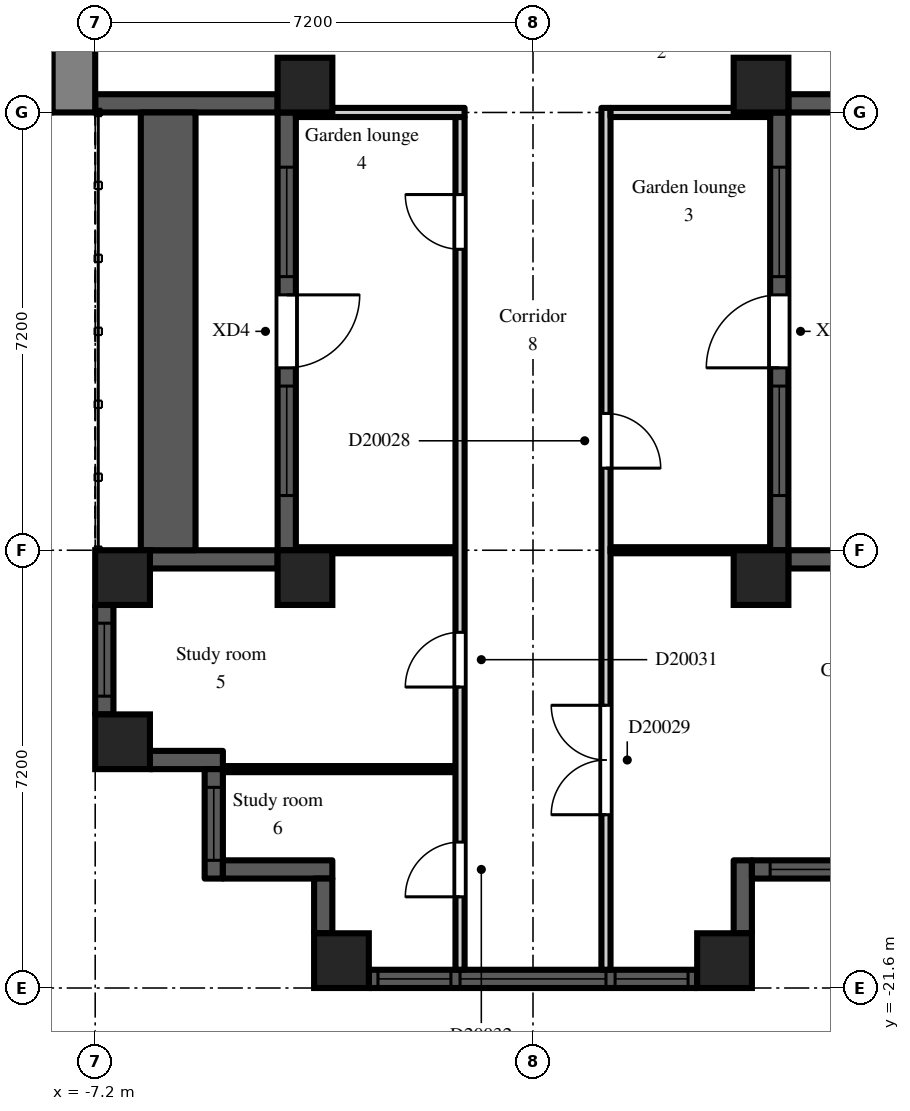
"""IFC4 building model, lengths in metres.
Left out: names, types, materials, properties, quantities, classifications, styles, units other than length and angle.
Written with IfcOpenShell. Run it as: python <this file> out.ifc"""

import sys

from ifc_helpers import new_model, si_unit, direction, frame, frame_2d, origin, origin_2d, place, context, subcontext, project, spatial, rectangle, extrude, element, fill, save


model = new_model("IFC4")
c1 = context("Model", 3, precision=1e-05, world=origin(), true_north=direction((0.0, 1.0)))
c2 = subcontext(c1, "Body", "Model", "MODEL_VIEW")
j1 = project(units=[si_unit("LENGTHUNIT", "METRE"), si_unit("PLANEANGLEUNIT", "RADIAN")], contexts=[c1])
p1 = place(None, origin())
s1 = spatial("IfcSite", under=j1, at=p1, CompositionType="ELEMENT")
p2 = place(p1, origin())
s2 = spatial("IfcBuilding", under=s1, at=p2, CompositionType="ELEMENT")
p3 = place(p2, frame((0.0, 0.0, 138.3)))
s3 = spatial("IfcBuildingStorey", under=s2, at=p3, CompositionType="ELEMENT", Elevation=138.3)
for number, where, z_axis, x_axis in (
    (1, (-6.75, -17.55, 0.0), (0.0, 0.0, 1.0), (1.0, 0.0, 0.0)),
    (2, (-6.75, -14.85, 0.0), (0.0, 0.0, 1.0), (1.0, 0.0, 0.0)),
    (3, (-3.75, -14.85, 0.0), (0.0, 0.0, 1.0), (1.0, 0.0, 0.0)),
    (4, (-3.75, -6.75, 0.0), (0.0, 0.0, 1.0), (1.0, 0.0, 0.0)),
    (5, (-3.15, -21.15, 0.0), (0.0, 0.0, 1.0), (1.0, 0.0, 0.0)),
    (6, (3.15, -21.15, 0.0), (0.0, 0.0, 1.0), (1.0, 0.0, 0.0)),
    (7, (3.75, -14.85, 0.0), (0.0, 0.0, 1.0), (1.0, 0.0, 0.0)),
    (8, (3.75, -6.75, 0.0), (0.0, 0.0, 1.0), (1.0, 0.0, 0.0)),
):
    element("IfcColumn", number, at=place(p3, frame(where, z_axis=z_axis, x_axis=x_axis)), inside=s3, PredefinedType="COLUMN", context=c2, shape_type="SweptSolid", body=[
        extrude(rectangle(XDim=0.9, YDim=0.9, at=origin_2d()), origin(), (0.0, 0.0, 1.0), 3.0),
    ])
p4 = place(p3, frame((-7.2, -7.05, 0.0), z_axis=(0.0, 0.0, 1.0), x_axis=(1.0, 0.0, 0.0)))
e9 = element("IfcWall", 9, at=p4, inside=s3, PredefinedType="SOLIDWALL", context=c2, shape_type="SweptSolid", body=[
    extrude(rectangle(XDim=3.0, YDim=0.3, at=frame_2d((1.5, 0.0))), origin(), (0.0, 0.0, 1.0), 2.2),
])
p5 = place(p3, frame((-4.05, -7.2, 0.0), z_axis=(0.0, 0.0, 1.0), x_axis=(0.0, -1.0, 0.0)))
e10 = element("IfcWall", 10, at=p5, inside=s3, PredefinedType="SOLIDWALL", context=c2, shape_type="SweptSolid", body=[
    extrude(rectangle(XDim=7.2, YDim=0.3, at=frame_2d((3.6, 0.0))), origin(), (0.0, 0.0, 1.0), 2.2),
])
p6 = place(p5, frame((3.0, 0.0, 0.0)))
e11 = element("IfcOpeningElement", 11, at=p6, cuts=e10, PredefinedType="OPENING", context=c2, shape_type="SweptSolid", body=[
    extrude(rectangle(XDim=1.2, YDim=2.05, at=frame_2d((0.6, 1.025))), frame((0.0, 0.16, 0.0), z_axis=(0.0, -1.0, 0.0), x_axis=(1.0, 0.0, 0.0)), (0.0, 0.0, 1.0), 0.32),
])
p7 = place(p5, frame((0.9, 0.0, 0.2)))
e12 = element("IfcOpeningElement", 12, at=p7, cuts=e10, PredefinedType="OPENING", context=c2, shape_type="SweptSolid", body=[
    extrude(rectangle(XDim=1.8, YDim=1.85, at=frame_2d((0.9, 0.925))), frame((0.0, 0.16, 0.0), z_axis=(0.0, -1.0, 0.0), x_axis=(1.0, 0.0, 0.0)), (0.0, 0.0, 1.0), 0.32),
])
p8 = place(p5, frame((4.5, 0.0, 0.2)))
e13 = element("IfcOpeningElement", 13, at=p8, cuts=e10, PredefinedType="OPENING", context=c2, shape_type="SweptSolid", body=[
    extrude(rectangle(XDim=1.8, YDim=1.85, at=frame_2d((0.9, 0.925))), frame((0.0, 0.16, 0.0), z_axis=(0.0, -1.0, 0.0), x_axis=(1.0, 0.0, 0.0)), (0.0, 0.0, 1.0), 0.32),
])
p9 = place(p3, frame((-4.2, -14.55, 0.0), z_axis=(0.0, 0.0, 1.0), x_axis=(-1.0, 0.0, 0.0)))
e14 = element("IfcWall", 14, at=p9, inside=s3, PredefinedType="SOLIDWALL", context=c2, shape_type="SweptSolid", body=[
    extrude(rectangle(XDim=2.1, YDim=0.3, at=frame_2d((1.05, 0.0))), origin(), (0.0, 0.0, 1.0), 2.2),
])
p10 = place(p3, frame((-7.05, -15.3, 0.0), z_axis=(0.0, 0.0, 1.0), x_axis=(0.0, -1.0, 0.0)))
e15 = element("IfcWall", 15, at=p10, inside=s3, PredefinedType="SOLIDWALL", context=c2, shape_type="SweptSolid", body=[
    extrude(rectangle(XDim=1.8, YDim=0.3, at=frame_2d((0.9, 0.0))), origin(), (0.0, 0.0, 1.0), 2.2),
])
p11 = place(p10, frame((0.3, 0.0, 0.2)))
e16 = element("IfcOpeningElement", 16, at=p11, cuts=e15, PredefinedType="OPENING", context=c2, shape_type="SweptSolid", body=[
    extrude(rectangle(XDim=1.2, YDim=1.85, at=frame_2d((0.6, 0.925))), frame((0.0, 0.16, 0.0), z_axis=(0.0, -1.0, 0.0), x_axis=(1.0, 0.0, 0.0)), (0.0, 0.0, 1.0), 0.32),
])
p12 = place(p3, frame((-6.3, -17.85, 0.0), z_axis=(0.0, 0.0, 1.0), x_axis=(1.0, 0.0, 0.0)))
e17 = element("IfcWall", 17, at=p12, inside=s3, PredefinedType="SOLIDWALL", context=c2, shape_type="SweptSolid", body=[
    extrude(rectangle(XDim=1.2, YDim=0.3, at=frame_2d((0.6, 0.0))), origin(), (0.0, 0.0, 1.0), 2.6),
])
p13 = place(p3, frame((-5.25, -18.0, 0.0), z_axis=(0.0, 0.0, 1.0), x_axis=(0.0, -1.0, 0.0)))
e18 = element("IfcWall", 18, at=p13, inside=s3, PredefinedType="SOLIDWALL", context=c2, shape_type="SweptSolid", body=[
    extrude(rectangle(XDim=1.8, YDim=0.3, at=frame_2d((0.9, 0.0))), origin(), (0.0, 0.0, 1.0), 2.6),
])
p14 = place(p13, frame((0.3, 0.0, 0.2)))
e19 = element("IfcOpeningElement", 19, at=p14, cuts=e18, PredefinedType="OPENING", context=c2, shape_type="SweptSolid", body=[
    extrude(rectangle(XDim=1.2, YDim=1.85, at=frame_2d((0.6, 0.925))), frame((0.0, 0.16, 0.0), z_axis=(0.0, -1.0, 0.0), x_axis=(1.0, 0.0, 0.0)), (0.0, 0.0, 1.0), 0.32),
])
p15 = place(p3, frame((-5.1, -19.65, 0.0), z_axis=(0.0, 0.0, 1.0), x_axis=(1.0, 0.0, 0.0)))
e20 = element("IfcWall", 20, at=p15, inside=s3, PredefinedType="SOLIDWALL", context=c2, shape_type="SweptSolid", body=[
    extrude(rectangle(XDim=1.8, YDim=0.3, at=frame_2d((0.9, 0.0))), origin(), (0.0, 0.0, 1.0), 2.6),
])
p16 = place(p3, frame((-3.45, -19.8, 0.0), z_axis=(0.0, 0.0, 1.0), x_axis=(0.0, -1.0, 0.0)))
e21 = element("IfcWall", 21, at=p16, inside=s3, PredefinedType="SOLIDWALL", context=c2, shape_type="SweptSolid", body=[
    extrude(rectangle(XDim=0.9, YDim=0.3, at=frame_2d((0.45, 0.0))), origin(), (0.0, 0.0, 1.0), 2.6),
])
p17 = place(p3, frame((-2.7, -21.45, 0.0), z_axis=(0.0, 0.0, 1.0), x_axis=(1.0, 0.0, 0.0)))
e22 = element("IfcWall", 22, at=p17, inside=s3, PredefinedType="SOLIDWALL", context=c2, shape_type="SweptSolid", body=[
    extrude(rectangle(XDim=5.4, YDim=0.3, at=frame_2d((2.7, 0.0))), origin(), (0.0, 0.0, 1.0), 2.2),
])
p18 = place(p17, frame((1.5, 0.0, 0.2)))
e23 = element("IfcOpeningElement", 23, at=p18, cuts=e22, PredefinedType="OPENING", context=c2, shape_type="SweptSolid", body=[
    extrude(rectangle(XDim=2.4, YDim=1.85, at=frame_2d((1.2, 0.925))), frame((0.0, 0.16, 0.0), z_axis=(0.0, -1.0, 0.0), x_axis=(1.0, 0.0, 0.0)), (0.0, 0.0, 1.0), 0.32),
])
p19 = place(p17, frame((0.15, 0.0, 0.2)))
e24 = element("IfcOpeningElement", 24, at=p19, cuts=e22, PredefinedType="OPENING", context=c2, shape_type="SweptSolid", body=[
    extrude(rectangle(XDim=1.2, YDim=1.85, at=frame_2d((0.6, 0.925))), frame((0.0, 0.16, 0.0), z_axis=(0.0, -1.0, 0.0), x_axis=(1.0, 0.0, 0.0)), (0.0, 0.0, 1.0), 0.32),
])
p20 = place(p17, frame((4.05, 0.0, 0.2)))
e25 = element("IfcOpeningElement", 25, at=p20, cuts=e22, PredefinedType="OPENING", context=c2, shape_type="SweptSolid", body=[
    extrude(rectangle(XDim=1.2, YDim=1.85, at=frame_2d((0.6, 0.925))), frame((0.0, 0.16, 0.0), z_axis=(0.0, -1.0, 0.0), x_axis=(1.0, 0.0, 0.0)), (0.0, 0.0, 1.0), 0.32),
])
p21 = place(p3, frame((3.45, -20.7, 0.0), z_axis=(0.0, 0.0, 1.0), x_axis=(0.0, 1.0, 0.0)))
e26 = element("IfcWall", 26, at=p21, inside=s3, PredefinedType="SOLIDWALL", context=c2, shape_type="SweptSolid", body=[
    extrude(rectangle(XDim=1.2, YDim=0.3, at=frame_2d((0.6, 0.0))), origin(), (0.0, 0.0, 1.0), 2.6),
])
p22 = place(p3, frame((3.6, -19.65, 0.0), z_axis=(0.0, 0.0, 1.0), x_axis=(1.0, 0.0, 0.0)))
e27 = element("IfcWall", 27, at=p22, inside=s3, PredefinedType="SOLIDWALL", context=c2, shape_type="SweptSolid", body=[
    extrude(rectangle(XDim=1.8, YDim=0.3, at=frame_2d((0.9, 0.0))), origin(), (0.0, 0.0, 1.0), 2.6),
])
p23 = place(p22, frame((0.3, 0.0, 0.2)))
e28 = element("IfcOpeningElement", 28, at=p23, cuts=e27, PredefinedType="OPENING", context=c2, shape_type="SweptSolid", body=[
    extrude(rectangle(XDim=1.2, YDim=1.85, at=frame_2d((0.6, 0.925))), frame((0.0, 0.16, 0.0), z_axis=(0.0, -1.0, 0.0), x_axis=(1.0, 0.0, 0.0)), (0.0, 0.0, 1.0), 0.32),
])
p24 = place(p3, frame((6.3, -14.55, 0.0), z_axis=(0.0, 0.0, 1.0), x_axis=(-1.0, 0.0, 0.0)))
e29 = element("IfcWall", 29, at=p24, inside=s3, PredefinedType="SOLIDWALL", context=c2, shape_type="SweptSolid", body=[
    extrude(rectangle(XDim=2.1, YDim=0.3, at=frame_2d((1.05, 0.0))), origin(), (0.0, 0.0, 1.0), 2.2),
])
p25 = place(p3, frame((4.05, -14.4, 0.0), z_axis=(0.0, 0.0, 1.0), x_axis=(0.0, 1.0, 0.0)))
e30 = element("IfcWall", 30, at=p25, inside=s3, PredefinedType="SOLIDWALL", context=c2, shape_type="SweptSolid", body=[
    extrude(rectangle(XDim=7.2, YDim=0.3, at=frame_2d((3.6, 0.0))), origin(), (0.0, 0.0, 1.0), 2.2),
])
p26 = place(p25, frame((3.0, 0.0, 0.0)))
e31 = element("IfcOpeningElement", 31, at=p26, cuts=e30, PredefinedType="OPENING", context=c2, shape_type="SweptSolid", body=[
    extrude(rectangle(XDim=1.2, YDim=2.05, at=frame_2d((0.6, 1.025))), frame((0.0, 0.16, 0.0), z_axis=(0.0, -1.0, 0.0), x_axis=(1.0, 0.0, 0.0)), (0.0, 0.0, 1.0), 0.32),
])
p27 = place(p25, frame((0.9, 0.0, 0.2)))
e32 = element("IfcOpeningElement", 32, at=p27, cuts=e30, PredefinedType="OPENING", context=c2, shape_type="SweptSolid", body=[
    extrude(rectangle(XDim=1.8, YDim=1.85, at=frame_2d((0.9, 0.925))), frame((0.0, 0.16, 0.0), z_axis=(0.0, -1.0, 0.0), x_axis=(1.0, 0.0, 0.0)), (0.0, 0.0, 1.0), 0.32),
])
p28 = place(p25, frame((4.5, 0.0, 0.2)))
e33 = element("IfcOpeningElement", 33, at=p28, cuts=e30, PredefinedType="OPENING", context=c2, shape_type="SweptSolid", body=[
    extrude(rectangle(XDim=1.8, YDim=1.85, at=frame_2d((0.9, 0.925))), frame((0.0, 0.16, 0.0), z_axis=(0.0, -1.0, 0.0), x_axis=(1.0, 0.0, 0.0)), (0.0, 0.0, 1.0), 0.32),
])
p29 = place(p3, frame((4.2, -7.05, 0.0), z_axis=(0.0, 0.0, 1.0), x_axis=(1.0, 0.0, 0.0)))
e34 = element("IfcWall", 34, at=p29, inside=s3, PredefinedType="SOLIDWALL", context=c2, shape_type="SweptSolid", body=[
    extrude(rectangle(XDim=3.0, YDim=0.3, at=frame_2d((1.5, 0.0))), origin(), (0.0, 0.0, 1.0), 2.2),
])
p30 = place(p3, frame((-6.0, -14.4, 0.0), z_axis=(0.0, 0.0, 1.0), x_axis=(0.0, 1.0, 0.0)))
e35 = element("IfcWall", 35, at=p30, inside=s3, PredefinedType="PARAPET", context=c2, shape_type="SweptSolid", body=[
    extrude(rectangle(XDim=7.2, YDim=0.9, at=frame_2d((3.6, 0.0))), origin(), (0.0, 0.0, 1.0), 0.8),
])
p31 = place(p3, frame((-7.55, -7.2, 0.0), z_axis=(0.0, 0.0, 1.0), x_axis=(0.0, 1.0, 0.0)))
e36 = element("IfcWall", 36, at=p31, inside=s3, PredefinedType="SHEAR", context=c2, shape_type="SweptSolid", body=[
    extrude(rectangle(XDim=14.4, YDim=0.7, at=frame_2d((7.2, 0.0))), origin(), (0.0, 0.0, 1.0), 2.6),
])
p32 = place(p31, frame((6.0, 0.0, 0.0)))
e37 = element("IfcOpeningElement", 37, at=p32, cuts=e36, PredefinedType="OPENING", context=c2, shape_type="SweptSolid", body=[
    extrude(rectangle(XDim=2.4, YDim=2.2, at=frame_2d((1.2, 1.1))), frame((0.0, 0.36, 0.0), z_axis=(0.0, -1.0, 0.0), x_axis=(1.0, 0.0, 0.0)), (0.0, 0.0, 1.0), 0.72),
])
p33 = place(p3, frame((-5.1, -18.0, 0.0), z_axis=(0.0, 0.0, 1.0), x_axis=(1.0, 0.0, 0.0)))
e38 = element("IfcWall", 38, at=p33, inside=s3, PredefinedType="PARTITIONING", context=c2, shape_type="SweptSolid", body=[
    extrude(rectangle(XDim=3.825, YDim=0.1, at=frame_2d((1.913, 0.0))), origin(), (0.0, 0.0, 1.0), 2.6),
])
p34 = place(p3, frame((-3.9, -14.4, 0.0), z_axis=(0.0, 0.0, 1.0), x_axis=(1.0, 0.0, 0.0)))
e39 = element("IfcWall", 39, at=p34, inside=s3, PredefinedType="PARTITIONING", context=c2, shape_type="SweptSolid", body=[
    extrude(rectangle(XDim=2.625, YDim=0.1, at=frame_2d((1.312, 0.0))), origin(), (0.0, 0.0, 1.0), 2.6),
])
p35 = place(p3, frame((-3.9, -7.2, 0.0), z_axis=(0.0, 0.0, 1.0), x_axis=(1.0, 0.0, 0.0)))
e40 = element("IfcWall", 40, at=p35, inside=s3, PredefinedType="PARTITIONING", context=c2, shape_type="SweptSolid", body=[
    extrude(rectangle(XDim=2.775, YDim=0.15, at=frame_2d((1.387, 0.0))), origin(), (0.0, 0.0, 1.0), 2.6),
])
p36 = place(p3, frame((-1.2, -21.3, 0.0), z_axis=(0.0, 0.0, 1.0), x_axis=(0.0, 1.0, 0.0)))
e41 = element("IfcWall", 41, at=p36, inside=s3, PredefinedType="PARTITIONING", context=c2, shape_type="SweptSolid", body=[
    extrude(rectangle(XDim=14.025, YDim=0.15, at=frame_2d((7.013, 0.0))), origin(), (0.0, 0.0, 1.0), 2.6),
])
p37 = place(p36, frame((11.85, 0.0, 0.0)))
e42 = element("IfcOpeningElement", 42, at=p37, cuts=e41, PredefinedType="OPENING", context=c2, shape_type="SweptSolid", body=[
    extrude(rectangle(XDim=0.9, YDim=2.1, at=frame_2d((0.45, 1.05))), frame((0.0, 0.085, 0.0), z_axis=(0.0, -1.0, 0.0), x_axis=(1.0, 0.0, 0.0)), (0.0, 0.0, 1.0), 0.17),
])
p38 = place(p36, frame((4.65, 0.0, 0.0)))
e43 = element("IfcOpeningElement", 43, at=p38, cuts=e41, PredefinedType="OPENING", context=c2, shape_type="SweptSolid", body=[
    extrude(rectangle(XDim=0.9, YDim=2.1, at=frame_2d((0.45, 1.05))), frame((0.0, 0.085, 0.0), z_axis=(0.0, -1.0, 0.0), x_axis=(1.0, 0.0, 0.0)), (0.0, 0.0, 1.0), 0.17),
])
p39 = place(p36, frame((1.2, 0.0, 0.0)))
e44 = element("IfcOpeningElement", 44, at=p39, cuts=e41, PredefinedType="OPENING", context=c2, shape_type="SweptSolid", body=[
    extrude(rectangle(XDim=0.9, YDim=2.1, at=frame_2d((0.45, 1.05))), frame((0.0, 0.085, 0.0), z_axis=(0.0, -1.0, 0.0), x_axis=(1.0, 0.0, 0.0)), (0.0, 0.0, 1.0), 0.17),
])
p40 = place(p3, frame((1.2, -21.3, 0.0), z_axis=(0.0, 0.0, 1.0), x_axis=(0.0, 1.0, 0.0)))
e45 = element("IfcWall", 45, at=p40, inside=s3, PredefinedType="PARTITIONING", context=c2, shape_type="SweptSolid", body=[
    extrude(rectangle(XDim=14.175, YDim=0.15, at=frame_2d((7.087, 0.0))), origin(), (0.0, 0.0, 1.0), 2.6),
])
p41 = place(p40, frame((8.25, 0.0, 0.0)))
e46 = element("IfcOpeningElement", 46, at=p41, cuts=e45, PredefinedType="OPENING", context=c2, shape_type="SweptSolid", body=[
    extrude(rectangle(XDim=0.9, YDim=2.1, at=frame_2d((0.45, 1.05))), frame((0.0, 0.085, 0.0), z_axis=(0.0, -1.0, 0.0), x_axis=(1.0, 0.0, 0.0)), (0.0, 0.0, 1.0), 0.17),
])
p42 = place(p40, frame((2.55, 0.0, 0.0)))
e47 = element("IfcOpeningElement", 47, at=p42, cuts=e45, PredefinedType="OPENING", context=c2, shape_type="SweptSolid", body=[
    extrude(rectangle(XDim=1.8, YDim=2.1, at=frame_2d((0.9, 1.05))), frame((0.0, 0.085, 0.0), z_axis=(0.0, -1.0, 0.0), x_axis=(1.0, 0.0, 0.0)), (0.0, 0.0, 1.0), 0.17),
])
p43 = place(p3, frame((1.275, -14.4, 0.0), z_axis=(0.0, 0.0, 1.0), x_axis=(1.0, 0.0, 0.0)))
e48 = element("IfcWall", 48, at=p43, inside=s3, PredefinedType="PARTITIONING", context=c2, shape_type="SweptSolid", body=[
    extrude(rectangle(XDim=2.625, YDim=0.1, at=frame_2d((1.312, 0.0))), origin(), (0.0, 0.0, 1.0), 2.6),
])
p44 = place(p3, frame((1.275, -7.2, 0.0), z_axis=(0.0, 0.0, 1.0), x_axis=(1.0, 0.0, 0.0)))
e49 = element("IfcWall", 49, at=p44, inside=s3, PredefinedType="PARTITIONING", context=c2, shape_type="SweptSolid", body=[
    extrude(rectangle(XDim=2.625, YDim=0.15, at=frame_2d((1.312, 0.0))), origin(), (0.0, 0.0, 1.0), 2.6),
])
p45 = place(p6, origin())
e50 = element("IfcDoor", 50, at=p45, inside=s3, OperationType="SINGLE_SWING_LEFT", PredefinedType="DOOR", context=c2, shape_type="SweptSolid", body=[
    extrude(rectangle(XDim=1.2, YDim=2.05, at=frame_2d((0.6, 1.025))), frame((0.0, 0.025, 0.0), z_axis=(0.0, -1.0, 0.0), x_axis=(1.0, 0.0, 0.0)), (0.0, 0.0, 1.0), 0.05),
])
fill(e11, e50)
p46 = place(p7, origin())
e51 = element("IfcWindow", 51, at=p46, inside=s3, PartitioningType="SINGLE_PANEL", PredefinedType="WINDOW", context=c2, shape_type="SweptSolid", body=[
    extrude(rectangle(XDim=1.8, YDim=1.85, at=frame_2d((0.9, 0.925))), frame((0.0, 0.03, 0.0), z_axis=(0.0, -1.0, 0.0), x_axis=(1.0, 0.0, 0.0)), (0.0, 0.0, 1.0), 0.06),
])
fill(e12, e51)
p47 = place(p8, origin())
e52 = element("IfcWindow", 52, at=p47, inside=s3, PartitioningType="SINGLE_PANEL", PredefinedType="WINDOW", context=c2, shape_type="SweptSolid", body=[
    extrude(rectangle(XDim=1.8, YDim=1.85, at=frame_2d((0.9, 0.925))), frame((0.0, 0.03, 0.0), z_axis=(0.0, -1.0, 0.0), x_axis=(1.0, 0.0, 0.0)), (0.0, 0.0, 1.0), 0.06),
])
fill(e13, e52)
p48 = place(p11, origin())
e53 = element("IfcWindow", 53, at=p48, inside=s3, PartitioningType="SINGLE_PANEL", PredefinedType="WINDOW", context=c2, shape_type="SweptSolid", body=[
    extrude(rectangle(XDim=1.2, YDim=1.85, at=frame_2d((0.6, 0.925))), frame((0.0, 0.03, 0.0), z_axis=(0.0, -1.0, 0.0), x_axis=(1.0, 0.0, 0.0)), (0.0, 0.0, 1.0), 0.06),
])
fill(e16, e53)
p49 = place(p14, origin())
e54 = element("IfcWindow", 54, at=p49, inside=s3, PartitioningType="SINGLE_PANEL", PredefinedType="WINDOW", context=c2, shape_type="SweptSolid", body=[
    extrude(rectangle(XDim=1.2, YDim=1.85, at=frame_2d((0.6, 0.925))), frame((0.0, 0.03, 0.0), z_axis=(0.0, -1.0, 0.0), x_axis=(1.0, 0.0, 0.0)), (0.0, 0.0, 1.0), 0.06),
])
fill(e19, e54)
p50 = place(p18, origin())
e55 = element("IfcWindow", 55, at=p50, inside=s3, PartitioningType="SINGLE_PANEL", PredefinedType="WINDOW", context=c2, shape_type="SweptSolid", body=[
    extrude(rectangle(XDim=2.4, YDim=1.85, at=frame_2d((1.2, 0.925))), frame((0.0, 0.03, 0.0), z_axis=(0.0, -1.0, 0.0), x_axis=(1.0, 0.0, 0.0)), (0.0, 0.0, 1.0), 0.06),
])
fill(e23, e55)
p51 = place(p19, origin())
e56 = element("IfcWindow", 56, at=p51, inside=s3, PartitioningType="SINGLE_PANEL", PredefinedType="WINDOW", context=c2, shape_type="SweptSolid", body=[
    extrude(rectangle(XDim=1.2, YDim=1.85, at=frame_2d((0.6, 0.925))), frame((0.0, 0.03, 0.0), z_axis=(0.0, -1.0, 0.0), x_axis=(1.0, 0.0, 0.0)), (0.0, 0.0, 1.0), 0.06),
])
fill(e24, e56)
p52 = place(p20, origin())
e57 = element("IfcWindow", 57, at=p52, inside=s3, PartitioningType="SINGLE_PANEL", PredefinedType="WINDOW", context=c2, shape_type="SweptSolid", body=[
    extrude(rectangle(XDim=1.2, YDim=1.85, at=frame_2d((0.6, 0.925))), frame((0.0, 0.03, 0.0), z_axis=(0.0, -1.0, 0.0), x_axis=(1.0, 0.0, 0.0)), (0.0, 0.0, 1.0), 0.06),
])
fill(e25, e57)
p53 = place(p23, origin())
e58 = element("IfcWindow", 58, at=p53, inside=s3, PartitioningType="SINGLE_PANEL", PredefinedType="WINDOW", context=c2, shape_type="SweptSolid", body=[
    extrude(rectangle(XDim=1.2, YDim=1.85, at=frame_2d((0.6, 0.925))), frame((0.0, 0.03, 0.0), z_axis=(0.0, -1.0, 0.0), x_axis=(1.0, 0.0, 0.0)), (0.0, 0.0, 1.0), 0.06),
])
fill(e28, e58)
p54 = place(p26, origin())
e59 = element("IfcDoor", 59, at=p54, inside=s3, OperationType="SINGLE_SWING_LEFT", PredefinedType="DOOR", context=c2, shape_type="SweptSolid", body=[
    extrude(rectangle(XDim=1.2, YDim=2.05, at=frame_2d((0.6, 1.025))), frame((0.0, 0.025, 0.0), z_axis=(0.0, -1.0, 0.0), x_axis=(1.0, 0.0, 0.0)), (0.0, 0.0, 1.0), 0.05),
])
fill(e31, e59)
p55 = place(p27, origin())
e60 = element("IfcWindow", 60, at=p55, inside=s3, PartitioningType="SINGLE_PANEL", PredefinedType="WINDOW", context=c2, shape_type="SweptSolid", body=[
    extrude(rectangle(XDim=1.8, YDim=1.85, at=frame_2d((0.9, 0.925))), frame((0.0, 0.03, 0.0), z_axis=(0.0, -1.0, 0.0), x_axis=(1.0, 0.0, 0.0)), (0.0, 0.0, 1.0), 0.06),
])
fill(e32, e60)
p56 = place(p28, origin())
e61 = element("IfcWindow", 61, at=p56, inside=s3, PartitioningType="SINGLE_PANEL", PredefinedType="WINDOW", context=c2, shape_type="SweptSolid", body=[
    extrude(rectangle(XDim=1.8, YDim=1.85, at=frame_2d((0.9, 0.925))), frame((0.0, 0.03, 0.0), z_axis=(0.0, -1.0, 0.0), x_axis=(1.0, 0.0, 0.0)), (0.0, 0.0, 1.0), 0.06),
])
fill(e33, e61)
p57 = place(p41, frame((0.9, 0.0, 0.0), z_axis=(0.0, 0.0, 1.0), x_axis=(-1.0, 0.0, 0.0)))
e62 = element("IfcDoor", 62, at=p57, inside=s3, OperationType="SINGLE_SWING_RIGHT", PredefinedType="DOOR", context=c2, shape_type="SweptSolid", body=[
    extrude(rectangle(XDim=0.9, YDim=2.1, at=frame_2d((0.45, 1.05))), frame((0.0, 0.025, 0.0), z_axis=(0.0, -1.0, 0.0), x_axis=(1.0, 0.0, 0.0)), (0.0, 0.0, 1.0), 0.05),
])
fill(e46, e62)
p58 = place(p42, origin())
e63 = element("IfcDoor", 63, at=p58, inside=s3, OperationType="DOUBLE_DOOR_DOUBLE_SWING", PredefinedType="DOOR", context=c2, shape_type="SweptSolid", body=[
    extrude(rectangle(XDim=1.8, YDim=2.1, at=frame_2d((0.9, 1.05))), frame((0.0, 0.025, 0.0), z_axis=(0.0, -1.0, 0.0), x_axis=(1.0, 0.0, 0.0)), (0.0, 0.0, 1.0), 0.05),
])
fill(e47, e63)
p59 = place(p37, origin())
e64 = element("IfcDoor", 64, at=p59, inside=s3, OperationType="SINGLE_SWING_RIGHT", PredefinedType="DOOR", context=c2, shape_type="SweptSolid", body=[
    extrude(rectangle(XDim=0.9, YDim=2.1, at=frame_2d((0.45, 1.05))), frame((0.0, 0.025, 0.0), z_axis=(0.0, -1.0, 0.0), x_axis=(1.0, 0.0, 0.0)), (0.0, 0.0, 1.0), 0.05),
])
fill(e42, e64)
p60 = place(p38, origin())
e65 = element("IfcDoor", 65, at=p60, inside=s3, OperationType="SINGLE_SWING_LEFT", PredefinedType="DOOR", context=c2, shape_type="SweptSolid", body=[
    extrude(rectangle(XDim=0.9, YDim=2.1, at=frame_2d((0.45, 1.05))), frame((0.0, 0.025, 0.0), z_axis=(0.0, -1.0, 0.0), x_axis=(1.0, 0.0, 0.0)), (0.0, 0.0, 1.0), 0.05),
])
fill(e43, e65)
p61 = place(p39, origin())
e66 = element("IfcDoor", 66, at=p61, inside=s3, OperationType="SINGLE_SWING_LEFT", PredefinedType="DOOR", context=c2, shape_type="SweptSolid", body=[
    extrude(rectangle(XDim=0.9, YDim=2.1, at=frame_2d((0.45, 1.05))), frame((0.0, 0.025, 0.0), z_axis=(0.0, -1.0, 0.0), x_axis=(1.0, 0.0, 0.0)), (0.0, 0.0, 1.0), 0.05),
])
fill(e44, e66)
save(model, sys.argv[1])
